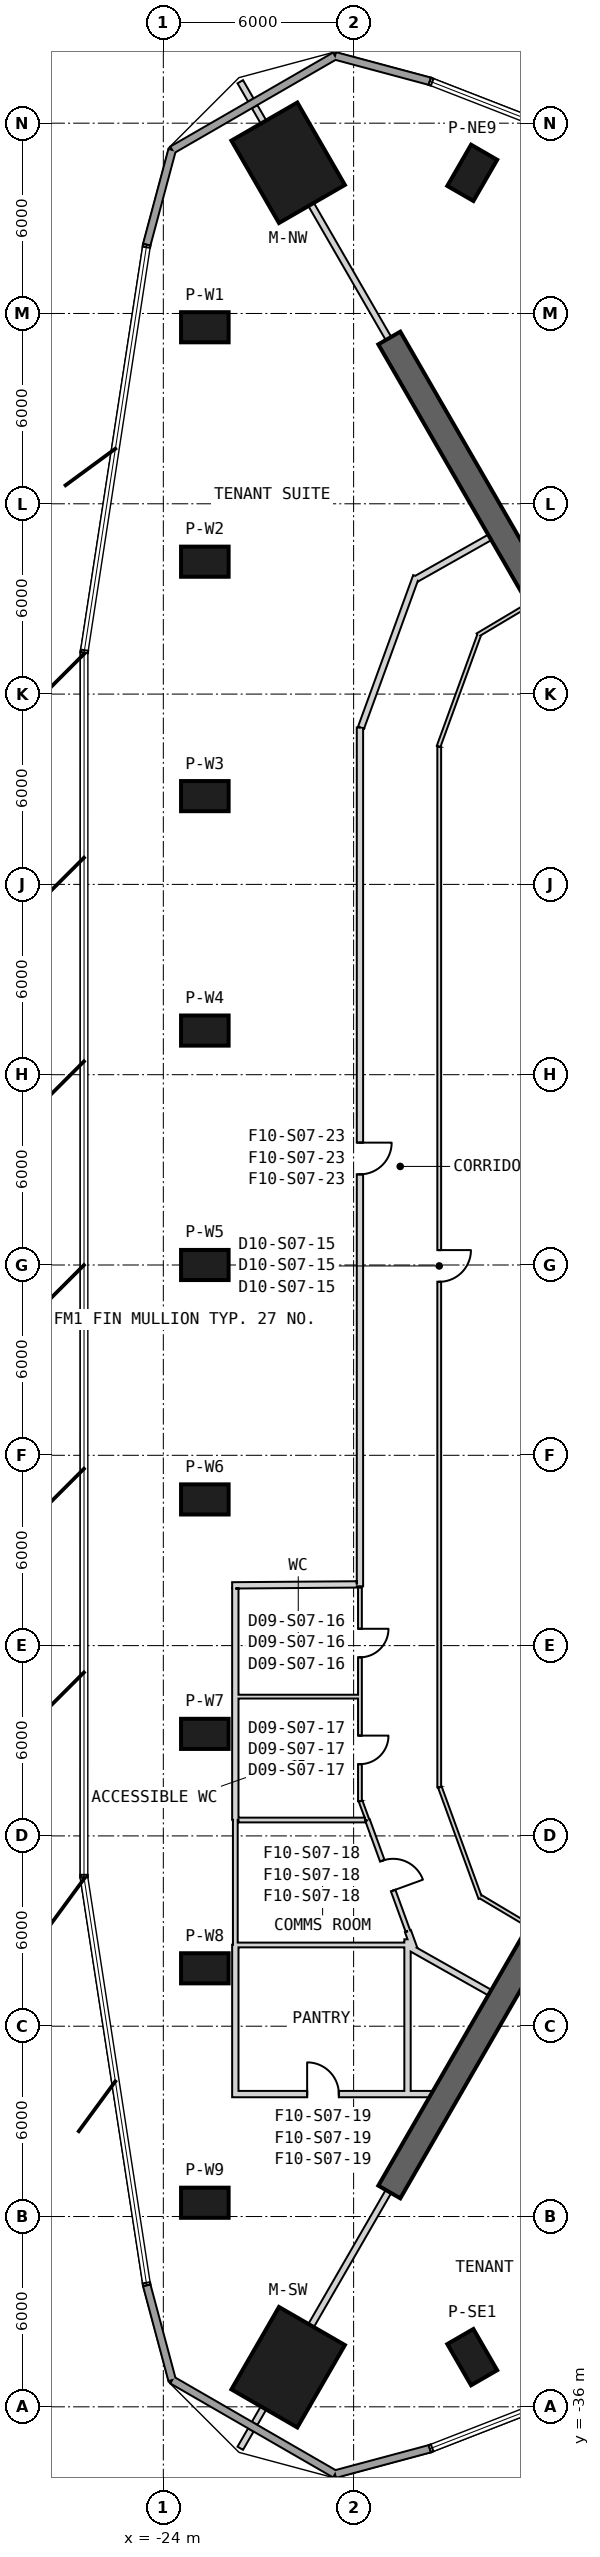
"""IFC4 building model, lengths in metres.
Left out: names, types, materials, properties, quantities, classifications, styles, units other than length and angle.
Written with IfcOpenShell. Run it as: python <this file> out.ifc"""

import sys

from ifc_helpers import new_model, si_unit, direction, frame, frame_2d, origin, origin_2d, place, context, subcontext, project, spatial, rectangle, extrude, element, fill, save


model = new_model("IFC4")
c1 = context("Model", 3, precision=1e-05, world=origin(), true_north=direction((0.0, 1.0)))
c2 = subcontext(c1, "Body", "Model", "MODEL_VIEW")
j1 = project(units=[si_unit("LENGTHUNIT", "METRE"), si_unit("PLANEANGLEUNIT", "RADIAN")], contexts=[c1])
p1 = place(None, origin())
s1 = spatial("IfcSite", under=j1, at=p1, CompositionType="ELEMENT")
p2 = place(p1, origin())
s2 = spatial("IfcBuilding", under=s1, at=p2, CompositionType="ELEMENT")
p3 = place(p2, frame((0.0, 0.0, 131.6)))
s3 = spatial("IfcBuildingStorey", under=s2, at=p3, CompositionType="ELEMENT", Elevation=131.6)
for number, where, z_axis, x_axis in (
    (1, (-20.064, 34.752, 0.0), (0.0, 0.0, 1.0), (-0.5, 0.866, 0.0)),
    (2, (-20.064, -34.752, 0.0), (0.0, 0.0, 1.0), (-0.5, -0.866, 0.0)),
):
    element("IfcColumn", number, at=place(p3, frame(where, z_axis=z_axis, x_axis=x_axis)), inside=s3, PredefinedType="COLUMN", context=c2, shape_type="SweptSolid", body=[
        extrude(rectangle(XDim=3.0, YDim=2.4, at=origin_2d()), origin(), (0.0, 0.0, 1.0), 4.1),
    ])
for number, where, z_axis, x_axis in (
    (3, (-22.691, 29.566, 0.0), (0.0, 0.0, 1.0), (-1.0, 0.0, 0.0)),
    (4, (-22.691, 22.174, 0.0), (0.0, 0.0, 1.0), (-1.0, 0.0, 0.0)),
    (5, (-22.691, 14.783, 0.0), (0.0, 0.0, 1.0), (-1.0, 0.0, 0.0)),
    (6, (-22.691, 7.391, 0.0), (0.0, 0.0, 1.0), (-1.0, 0.0, 0.0)),
    (7, (-22.691, 0.0, 0.0), (0.0, 0.0, 1.0), (-1.0, 0.0, 0.0)),
    (8, (-22.691, -7.391, 0.0), (0.0, 0.0, 1.0), (-1.0, 0.0, 0.0)),
    (9, (-22.691, -14.783, 0.0), (0.0, 0.0, 1.0), (-1.0, 0.0, 0.0)),
    (10, (-22.691, -22.174, 0.0), (0.0, 0.0, 1.0), (-1.0, 0.0, 0.0)),
    (11, (-22.691, -29.566, 0.0), (0.0, 0.0, 1.0), (-1.0, 0.0, 0.0)),
    (12, (-14.259, 34.434, 0.0), (0.0, 0.0, 1.0), (0.5, 0.866, 0.0)),
    (13, (-14.259, -34.434, 0.0), (0.0, 0.0, 1.0), (0.5, -0.866, 0.0)),
):
    element("IfcColumn", number, at=place(p3, frame(where, z_axis=z_axis, x_axis=x_axis)), inside=s3, PredefinedType="COLUMN", context=c2, shape_type="SweptSolid", body=[
        extrude(rectangle(XDim=1.5, YDim=0.95, at=origin_2d()), origin(), (0.0, 0.0, 1.0), 4.1),
    ])
p4 = place(p3, frame((-10.575, 18.316, 0.0), z_axis=(0.0, 0.0, 1.0), x_axis=(-0.500005394759, 0.866022289097, 0.0)))
e14 = element("IfcWall", 14, at=p4, inside=s3, PredefinedType="SHEAR", context=c2, shape_type="SweptSolid", body=[
    extrude(rectangle(XDim=12.598, YDim=0.8, at=frame_2d((6.299, 0.0))), origin(), (0.0, 0.0, 1.0), 4.1),
])
p5 = place(p4, frame((1.3, 0.0, 0.0)))
e15 = element("IfcOpeningElement", 15, at=p5, cuts=e14, PredefinedType="OPENING", context=c2, shape_type="SweptSolid", body=[
    extrude(rectangle(XDim=1.4, YDim=2.4, at=frame_2d((0.7, 1.2))), frame((0.0, 0.41, 0.0), z_axis=(0.0, -1.0, 0.0), x_axis=(1.0, 0.0, 0.0)), (0.0, 0.0, 1.0), 0.82),
])
p6 = place(p3, frame((-10.575, -18.316, 0.0), z_axis=(0.0, 0.0, 1.0), x_axis=(-0.500005394759, -0.866022289097, 0.0)))
e16 = element("IfcWall", 16, at=p6, inside=s3, PredefinedType="SHEAR", context=c2, shape_type="SweptSolid", body=[
    extrude(rectangle(XDim=12.598, YDim=0.8, at=frame_2d((6.299, 0.0))), origin(), (0.0, 0.0, 1.0), 4.1),
])
p7 = place(p6, frame((1.3, 0.0, 0.0)))
e17 = element("IfcOpeningElement", 17, at=p7, cuts=e16, PredefinedType="OPENING", context=c2, shape_type="SweptSolid", body=[
    extrude(rectangle(XDim=1.4, YDim=2.4, at=frame_2d((0.7, 1.2))), frame((0.0, 0.41, 0.0), z_axis=(0.0, -1.0, 0.0), x_axis=(1.0, 0.0, 0.0)), (0.0, 0.0, 1.0), 0.82),
])
p8 = place(p3, frame((-15.596, 37.322, 0.0), z_axis=(0.0, 0.0, 1.0), x_axis=(-0.965937138664, 0.258776823055, 0.0)))
e18 = element("IfcWall", 18, at=p8, inside=s3, PredefinedType="SOLIDWALL", context=c2, shape_type="SweptSolid", body=[
    extrude(rectangle(XDim=3.095, YDim=0.24, at=frame_2d((1.548, 0.0))), origin(), (0.0, 0.0, 1.0), 3.8),
])
p9 = place(p3, frame((-18.586, 38.123, 0.0), z_axis=(0.0, 0.0, 1.0), x_axis=(-0.866020370013, -0.500008718647, 0.0)))
e19 = element("IfcWall", 19, at=p9, inside=s3, PredefinedType="SOLIDWALL", context=c2, shape_type="SweptSolid", body=[
    extrude(rectangle(XDim=5.931, YDim=0.24, at=frame_2d((2.965, 0.0))), origin(), (0.0, 0.0, 1.0), 3.8),
])
for number, where, z_axis, x_axis in (
    (20, (-23.722, 35.158, 0.0), (0.0, 0.0, 1.0), (-0.259, -0.966, 0.0)),
    (21, (-24.524, -32.168, 0.0), (0.0, 0.0, 1.0), (0.259, -0.966, 0.0)),
):
    element("IfcWall", number, at=place(p3, frame(where, z_axis=z_axis, x_axis=x_axis)), inside=s3, PredefinedType="SOLIDWALL", context=c2, shape_type="SweptSolid", body=[
        extrude(rectangle(XDim=3.095, YDim=0.24, at=frame_2d((1.548, 0.0))), origin(), (0.0, 0.0, 1.0), 3.8),
    ])
p10 = place(p3, frame((-23.722, -35.158, 0.0), z_axis=(0.0, 0.0, 1.0), x_axis=(0.866020370013, -0.500008718647, 0.0)))
e22 = element("IfcWall", 22, at=p10, inside=s3, PredefinedType="SOLIDWALL", context=c2, shape_type="SweptSolid", body=[
    extrude(rectangle(XDim=5.931, YDim=0.24, at=frame_2d((2.965, 0.0))), origin(), (0.0, 0.0, 1.0), 3.8),
])
p11 = place(p3, frame((-18.586, -38.123, 0.0), z_axis=(0.0, 0.0, 1.0), x_axis=(0.965937138664, 0.258776823055, 0.0)))
e23 = element("IfcWall", 23, at=p11, inside=s3, PredefinedType="SOLIDWALL", context=c2, shape_type="SweptSolid", body=[
    extrude(rectangle(XDim=3.095, YDim=0.24, at=frame_2d((1.548, 0.0))), origin(), (0.0, 0.0, 1.0), 3.8),
])
p12 = place(p3, frame((-12.482, 20.819, 0.0), z_axis=(0.0, 0.0, 1.0), x_axis=(-0.85913200524, -0.511754040113, 0.0)))
e24 = element("IfcWall", 24, at=p12, inside=s3, PredefinedType="PARTITIONING", context=c2, shape_type="SweptSolid", body=[
    extrude(rectangle(XDim=1.875, YDim=0.12, at=frame_2d((0.937, 0.0))), origin(), (0.0, 0.0, 1.0), 3.8),
])
p13 = place(p3, frame((-14.038, 19.872, 0.0), z_axis=(0.0, 0.0, 1.0), x_axis=(-0.342035870777, -0.939686896313, 0.0)))
e25 = element("IfcWall", 25, at=p13, inside=s3, PredefinedType="PARTITIONING", context=c2, shape_type="SweptSolid", body=[
    extrude(rectangle(XDim=3.749, YDim=0.12, at=frame_2d((1.875, 0.0))), origin(), (0.0, 0.0, 1.0), 2.88),
])
p14 = place(p3, frame((-15.3, 16.345, 0.0), z_axis=(0.0, 0.0, 1.0), x_axis=(0.0, -1.0, 0.0)))
e26 = element("IfcWall", 26, at=p14, inside=s3, PredefinedType="PARTITIONING", context=c2, shape_type="SweptSolid", body=[
    extrude(rectangle(XDim=32.811, YDim=0.12, at=frame_2d((16.405, 0.0))), origin(), (0.0, 0.0, 1.0), 2.98),
])
p15 = place(p14, frame((15.875, 0.0, 0.0)))
e27 = element("IfcOpeningElement", 27, at=p15, cuts=e26, PredefinedType="OPENING", context=c2, shape_type="SweptSolid", body=[
    extrude(rectangle(XDim=1.0, YDim=2.1, at=frame_2d((0.5, 1.05))), frame((0.0, 0.07, 0.0), z_axis=(0.0, -1.0, 0.0), x_axis=(1.0, 0.0, 0.0)), (0.0, 0.0, 1.0), 0.14),
])
p16 = place(p3, frame((-15.28, -16.462, 0.0), z_axis=(0.0, 0.0, 1.0), x_axis=(0.34206888523, -0.939674878752, 0.0)))
e28 = element("IfcWall", 28, at=p16, inside=s3, PredefinedType="PARTITIONING", context=c2, shape_type="SweptSolid", body=[
    extrude(rectangle(XDim=3.73, YDim=0.12, at=frame_2d((1.865, 0.0))), origin(), (0.0, 0.0, 1.0), 2.88),
])
p17 = place(p3, frame((-14.005, -19.912, 0.0), z_axis=(0.0, 0.0, 1.0), x_axis=(0.859128591272, -0.511759771435, 0.0)))
e29 = element("IfcWall", 29, at=p17, inside=s3, PredefinedType="PARTITIONING", context=c2, shape_type="SweptSolid", body=[
    extrude(rectangle(XDim=1.773, YDim=0.12, at=frame_2d((0.887, 0.0))), origin(), (0.0, 0.0, 1.0), 3.8),
])
p18 = place(p3, frame((-17.8, 16.946, 0.0), z_axis=(0.0, 0.0, 1.0), x_axis=(0.0, -1.0, 0.0)))
e30 = element("IfcWall", 30, at=p18, inside=s3, PredefinedType="PARTITIONING", context=c2, shape_type="SweptSolid", body=[
    extrude(rectangle(XDim=27.076, YDim=0.2, at=frame_2d((13.538, 0.0))), origin(), (0.0, 0.0, 1.0), 3.08),
])
p19 = place(p18, frame((13.088, 0.0, 0.0)))
e31 = element("IfcOpeningElement", 31, at=p19, cuts=e30, PredefinedType="OPENING", context=c2, shape_type="SweptSolid", body=[
    extrude(rectangle(XDim=1.0, YDim=2.1, at=frame_2d((0.5, 1.05))), frame((0.0, 0.11, 0.0), z_axis=(0.0, -1.0, 0.0), x_axis=(1.0, 0.0, 0.0)), (0.0, 0.0, 1.0), 0.22),
])
p20 = place(p3, frame((-16.027, 21.718, 0.0), z_axis=(0.0, 0.0, 1.0), x_axis=(-0.342039923135, -0.939685421288, 0.0)))
e32 = element("IfcWall", 32, at=p20, inside=s3, PredefinedType="PARTITIONING", context=c2, shape_type="SweptSolid", body=[
    extrude(rectangle(XDim=5.084, YDim=0.2, at=frame_2d((2.542, 0.0))), origin(), (0.0, 0.0, 1.0), 2.88),
])
p21 = place(p3, frame((-13.707, 22.94, 0.0), z_axis=(0.0, 0.0, 1.0), x_axis=(-0.870827475384, -0.491588759143, 0.0)))
e33 = element("IfcWall", 33, at=p21, inside=s3, PredefinedType="PARTITIONING", context=c2, shape_type="SweptSolid", body=[
    extrude(rectangle(XDim=2.662, YDim=0.2, at=frame_2d((1.331, 0.0))), origin(), (0.0, 0.0, 1.0), 3.8),
])
p22 = place(p3, frame((-16.2, -21.532, 0.0), z_axis=(0.0, 0.0, 1.0), x_axis=(0.870802525435, -0.491632954241, 0.0)))
e34 = element("IfcWall", 34, at=p22, inside=s3, PredefinedType="PARTITIONING", context=c2, shape_type="SweptSolid", body=[
    extrude(rectangle(XDim=2.863, YDim=0.2, at=frame_2d((1.432, 0.0))), origin(), (0.0, 0.0, 1.0), 3.8),
])
p23 = place(p3, frame((-16.288, -21.001, 0.0), z_axis=(0.0, 0.0, 1.0), x_axis=(0.342137351889, -0.939649952079, 0.0)))
e35 = element("IfcWall", 35, at=p23, inside=s3, PredefinedType="PARTITIONING", context=c2, shape_type="SweptSolid", body=[
    extrude(rectangle(XDim=0.596, YDim=0.2, at=frame_2d((0.298, 0.0))), origin(), (0.0, 0.0, 1.0), 2.88),
])
p24 = place(p3, frame((-17.8, -10.17, 0.0), z_axis=(0.0, 0.0, 1.0), x_axis=(0.0, -1.0, 0.0)))
e36 = element("IfcWall", 36, at=p24, inside=s3, PredefinedType="PARTITIONING", context=c2, shape_type="SweptSolid", body=[
    extrude(rectangle(XDim=6.736, YDim=0.12, at=frame_2d((3.368, 0.0))), origin(), (0.0, 0.0, 1.0), 3.08),
])
p25 = place(p24, frame((1.3, 0.0, 0.0)))
e37 = element("IfcOpeningElement", 37, at=p25, cuts=e36, PredefinedType="OPENING", context=c2, shape_type="SweptSolid", body=[
    extrude(rectangle(XDim=0.9, YDim=2.1, at=frame_2d((0.45, 1.05))), frame((0.0, 0.07, 0.0), z_axis=(0.0, -1.0, 0.0), x_axis=(1.0, 0.0, 0.0)), (0.0, 0.0, 1.0), 0.14),
])
p26 = place(p24, frame((4.667, 0.0, 0.0)))
e38 = element("IfcOpeningElement", 38, at=p26, cuts=e36, PredefinedType="OPENING", context=c2, shape_type="SweptSolid", body=[
    extrude(rectangle(XDim=0.9, YDim=2.1, at=frame_2d((0.45, 1.05))), frame((0.0, 0.07, 0.0), z_axis=(0.0, -1.0, 0.0), x_axis=(1.0, 0.0, 0.0)), (0.0, 0.0, 1.0), 0.14),
])
p27 = place(p3, frame((-17.78, -16.902, 0.0), z_axis=(0.0, 0.0, 1.0), x_axis=(0.341988220281, -0.93970423921, 0.0)))
e39 = element("IfcWall", 39, at=p27, inside=s3, PredefinedType="PARTITIONING", context=c2, shape_type="SweptSolid", body=[
    extrude(rectangle(XDim=0.64, YDim=0.12, at=frame_2d((0.32, 0.0))), origin(), (0.0, 0.0, 1.0), 2.98),
])
p28 = place(p3, frame((-17.561, -17.503, 0.0), z_axis=(0.0, 0.0, 1.0), x_axis=(0.342022140343, -0.939691893929, 0.0)))
e40 = element("IfcWall", 40, at=p28, inside=s3, PredefinedType="PLUMBINGWALL", context=c2, shape_type="SweptSolid", body=[
    extrude(rectangle(XDim=3.723, YDim=0.15, at=frame_2d((1.861, 0.0))), origin(), (0.0, 0.0, 1.0), 2.88),
])
p29 = place(p28, frame((1.361, 0.0, 0.0)))
e41 = element("IfcOpeningElement", 41, at=p29, cuts=e40, PredefinedType="OPENING", context=c2, shape_type="SweptSolid", body=[
    extrude(rectangle(XDim=1.0, YDim=2.1, at=frame_2d((0.5, 1.05))), frame((0.0, 0.085, 0.0), z_axis=(0.0, -1.0, 0.0), x_axis=(1.0, 0.0, 0.0)), (0.0, 0.0, 1.0), 0.17),
])
p30 = place(p3, frame((-21.574, 37.307, 0.0), z_axis=(0.0, 0.0, 1.0), x_axis=(0.499880961361, -0.866094119867, 0.0)))
e42 = element("IfcWall", 42, at=p30, inside=s3, PredefinedType="PARTITIONING", context=c2, shape_type="SweptSolid", body=[
    extrude(rectangle(XDim=0.667, YDim=0.2, at=frame_2d((0.333, 0.0))), origin(), (0.0, 0.0, 1.0), 3.8),
])
p31 = place(p3, frame((-21.121, 36.522, 0.0), z_axis=(0.0, 0.0, 1.0), x_axis=(0.500161656815, -0.86593205106, 0.0)))
e43 = element("IfcWall", 43, at=p31, inside=s3, PredefinedType="PARTITIONING", context=c2, shape_type="SweptSolid", body=[
    extrude(rectangle(XDim=0.561, YDim=0.2, at=frame_2d((0.281, 0.0))), origin(), (0.0, 0.0, 1.0), 3.8),
])
p32 = place(p3, frame((-19.34, 33.438, 0.0), z_axis=(0.0, 0.0, 1.0), x_axis=(0.500002508028, -0.866023955769, 0.0)))
e44 = element("IfcWall", 44, at=p32, inside=s3, PredefinedType="PARTITIONING", context=c2, shape_type="SweptSolid", body=[
    extrude(rectangle(XDim=4.88, YDim=0.2, at=frame_2d((2.44, 0.0))), origin(), (0.0, 0.0, 1.0), 3.37),
])
p33 = place(p3, frame((-21.574, -37.307, 0.0), z_axis=(0.0, 0.0, 1.0), x_axis=(0.499880961361, 0.866094119867, 0.0)))
e45 = element("IfcWall", 45, at=p33, inside=s3, PredefinedType="PARTITIONING", context=c2, shape_type="SweptSolid", body=[
    extrude(rectangle(XDim=0.667, YDim=0.2, at=frame_2d((0.333, 0.0))), origin(), (0.0, 0.0, 1.0), 3.8),
])
p34 = place(p3, frame((-21.121, -36.522, 0.0), z_axis=(0.0, 0.0, 1.0), x_axis=(0.500161656815, 0.86593205106, 0.0)))
e46 = element("IfcWall", 46, at=p34, inside=s3, PredefinedType="PARTITIONING", context=c2, shape_type="SweptSolid", body=[
    extrude(rectangle(XDim=0.561, YDim=0.2, at=frame_2d((0.281, 0.0))), origin(), (0.0, 0.0, 1.0), 3.8),
])
p35 = place(p3, frame((-19.34, -33.438, 0.0), z_axis=(0.0, 0.0, 1.0), x_axis=(0.500002508028, 0.866023955769, 0.0)))
e47 = element("IfcWall", 47, at=p35, inside=s3, PredefinedType="PARTITIONING", context=c2, shape_type="SweptSolid", body=[
    extrude(rectangle(XDim=4.88, YDim=0.2, at=frame_2d((2.44, 0.0))), origin(), (0.0, 0.0, 1.0), 3.37),
])
p36 = place(p3, frame((-21.83, -10.101, 0.0), z_axis=(0.0, 0.0, 1.0), x_axis=(0.999970811124, 0.007640477685, 0.0)))
e48 = element("IfcWall", 48, at=p36, inside=s3, PredefinedType="PARTITIONING", context=c2, shape_type="SweptSolid", body=[
    extrude(rectangle(XDim=3.93, YDim=0.2, at=frame_2d((1.965, 0.0))), origin(), (0.0, 0.0, 1.0), 3.8),
])
p37 = place(p3, frame((-21.73, -26.24, 0.0), z_axis=(0.0, 0.0, 1.0), x_axis=(0.0, 1.0, 0.0)))
e49 = element("IfcWall", 49, at=p37, inside=s3, PredefinedType="PARTITIONING", context=c2, shape_type="SweptSolid", body=[
    extrude(rectangle(XDim=4.809, YDim=0.2, at=frame_2d((2.404, 0.0))), origin(), (0.0, 0.0, 1.0), 2.98),
])
p38 = place(p3, frame((-21.73, -17.491, 0.0), z_axis=(0.0, 0.0, 1.0), x_axis=(0.0, 1.0, 0.0)))
e50 = element("IfcWall", 50, at=p38, inside=s3, PredefinedType="PARTITIONING", context=c2, shape_type="SweptSolid", body=[
    extrude(rectangle(XDim=7.292, YDim=0.2, at=frame_2d((3.646, 0.0))), origin(), (0.0, 0.0, 1.0), 3.08),
])
p39 = place(p3, frame((-21.73, -21.431, 0.0), z_axis=(0.0, 0.0, 1.0), x_axis=(0.0, 1.0, 0.0)))
e51 = element("IfcWall", 51, at=p39, inside=s3, PredefinedType="PLUMBINGWALL", context=c2, shape_type="SweptSolid", body=[
    extrude(rectangle(XDim=3.94, YDim=0.15, at=frame_2d((1.97, 0.0))), origin(), (0.0, 0.0, 1.0), 2.98),
])
p40 = place(p3, frame((-21.63, -26.14, 0.0), z_axis=(0.0, 0.0, 1.0), x_axis=(1.0, 0.0, 0.0)))
e52 = element("IfcWall", 52, at=p40, inside=s3, PredefinedType="PARTITIONING", context=c2, shape_type="SweptSolid", body=[
    extrude(rectangle(XDim=6.076, YDim=0.2, at=frame_2d((3.038, 0.0))), origin(), (0.0, 0.0, 1.0), 2.88),
])
p41 = place(p40, frame((2.165, 0.0, 0.0)))
e53 = element("IfcOpeningElement", 53, at=p41, cuts=e52, PredefinedType="OPENING", context=c2, shape_type="SweptSolid", body=[
    extrude(rectangle(XDim=1.0, YDim=2.1, at=frame_2d((0.5, 1.05))), frame((0.0, 0.11, 0.0), z_axis=(0.0, -1.0, 0.0), x_axis=(1.0, 0.0, 0.0)), (0.0, 0.0, 1.0), 0.22),
])
p42 = place(p3, frame((-16.3, -26.04, 0.0), z_axis=(0.0, 0.0, 1.0), x_axis=(0.0, 1.0, 0.0)))
e54 = element("IfcWall", 54, at=p42, inside=s3, PredefinedType="PARTITIONING", context=c2, shape_type="SweptSolid", body=[
    extrude(rectangle(XDim=4.78, YDim=0.2, at=frame_2d((2.39, 0.0))), origin(), (0.0, 0.0, 1.0), 2.88),
])
p43 = place(p3, frame((-17.86, -13.609, 0.0), z_axis=(0.0, 0.0, 1.0), x_axis=(-1.0, 0.0, 0.0)))
e55 = element("IfcWall", 55, at=p43, inside=s3, PredefinedType="PARTITIONING", context=c2, shape_type="SweptSolid", body=[
    extrude(rectangle(XDim=3.77, YDim=0.12, at=frame_2d((1.885, 0.0))), origin(), (0.0, 0.0, 1.0), 3.08),
])
p44 = place(p3, frame((-17.626, -17.499, 0.0), z_axis=(0.0, 0.0, 1.0), x_axis=(-1.0, 0.0, 0.0)))
e56 = element("IfcWall", 56, at=p44, inside=s3, PredefinedType="PLUMBINGWALL", context=c2, shape_type="SweptSolid", body=[
    extrude(rectangle(XDim=4.004, YDim=0.15, at=frame_2d((2.002, 0.0))), origin(), (0.0, 0.0, 1.0), 2.98),
])
p45 = place(p3, frame((-16.375, -21.439, 0.0), z_axis=(0.0, 0.0, 1.0), x_axis=(-1.0, 0.0, 0.0)))
e57 = element("IfcWall", 57, at=p45, inside=s3, PredefinedType="PLUMBINGWALL", context=c2, shape_type="SweptSolid", body=[
    extrude(rectangle(XDim=5.28, YDim=0.15, at=frame_2d((2.64, 0.0))), origin(), (0.0, 0.0, 1.0), 2.88),
])
p46 = place(p15, origin())
e58 = element("IfcDoor", 58, at=p46, inside=s3, OperationType="SINGLE_SWING_LEFT", PredefinedType="NOTDEFINED", context=c2, shape_type="SweptSolid", body=[
    extrude(rectangle(XDim=1.0, YDim=2.1, at=frame_2d((0.5, 1.05))), frame((0.0, 0.025, 0.0), z_axis=(0.0, -1.0, 0.0), x_axis=(1.0, 0.0, 0.0)), (0.0, 0.0, 1.0), 0.05),
])
fill(e27, e58)
p47 = place(p25, origin())
e59 = element("IfcDoor", 59, at=p47, inside=s3, OperationType="SINGLE_SWING_LEFT", PredefinedType="NOTDEFINED", context=c2, shape_type="SweptSolid", body=[
    extrude(rectangle(XDim=0.9, YDim=2.1, at=frame_2d((0.45, 1.05))), frame((0.0, 0.025, 0.0), z_axis=(0.0, -1.0, 0.0), x_axis=(1.0, 0.0, 0.0)), (0.0, 0.0, 1.0), 0.05),
])
fill(e37, e59)
p48 = place(p26, origin())
e60 = element("IfcDoor", 60, at=p48, inside=s3, OperationType="SINGLE_SWING_RIGHT", PredefinedType="NOTDEFINED", context=c2, shape_type="SweptSolid", body=[
    extrude(rectangle(XDim=0.9, YDim=2.1, at=frame_2d((0.45, 1.05))), frame((0.0, 0.025, 0.0), z_axis=(0.0, -1.0, 0.0), x_axis=(1.0, 0.0, 0.0)), (0.0, 0.0, 1.0), 0.05),
])
fill(e38, e60)
p49 = place(p29, origin())
e61 = element("IfcDoor", 61, at=p49, inside=s3, OperationType="SINGLE_SWING_LEFT", PredefinedType="USERDEFINED", context=c2, shape_type="SweptSolid", body=[
    extrude(rectangle(XDim=1.0, YDim=2.1, at=frame_2d((0.5, 1.05))), frame((0.0, 0.025, 0.0), z_axis=(0.0, -1.0, 0.0), x_axis=(1.0, 0.0, 0.0)), (0.0, 0.0, 1.0), 0.05),
])
fill(e41, e61)
p50 = place(p41, origin())
e62 = element("IfcDoor", 62, at=p50, inside=s3, OperationType="SINGLE_SWING_LEFT", PredefinedType="USERDEFINED", context=c2, shape_type="SweptSolid", body=[
    extrude(rectangle(XDim=1.0, YDim=2.1, at=frame_2d((0.5, 1.05))), frame((0.0, 0.025, 0.0), z_axis=(0.0, -1.0, 0.0), x_axis=(1.0, 0.0, 0.0)), (0.0, 0.0, 1.0), 0.05),
])
fill(e53, e62)
p51 = place(p19, origin())
e63 = element("IfcDoor", 63, at=p51, inside=s3, OperationType="SINGLE_SWING_LEFT", PredefinedType="USERDEFINED", context=c2, shape_type="SweptSolid", body=[
    extrude(rectangle(XDim=1.0, YDim=2.1, at=frame_2d((0.5, 1.05))), frame((0.0, 0.025, 0.0), z_axis=(0.0, -1.0, 0.0), x_axis=(1.0, 0.0, 0.0)), (0.0, 0.0, 1.0), 0.05),
])
fill(e31, e63)
save(model, sys.argv[1])
